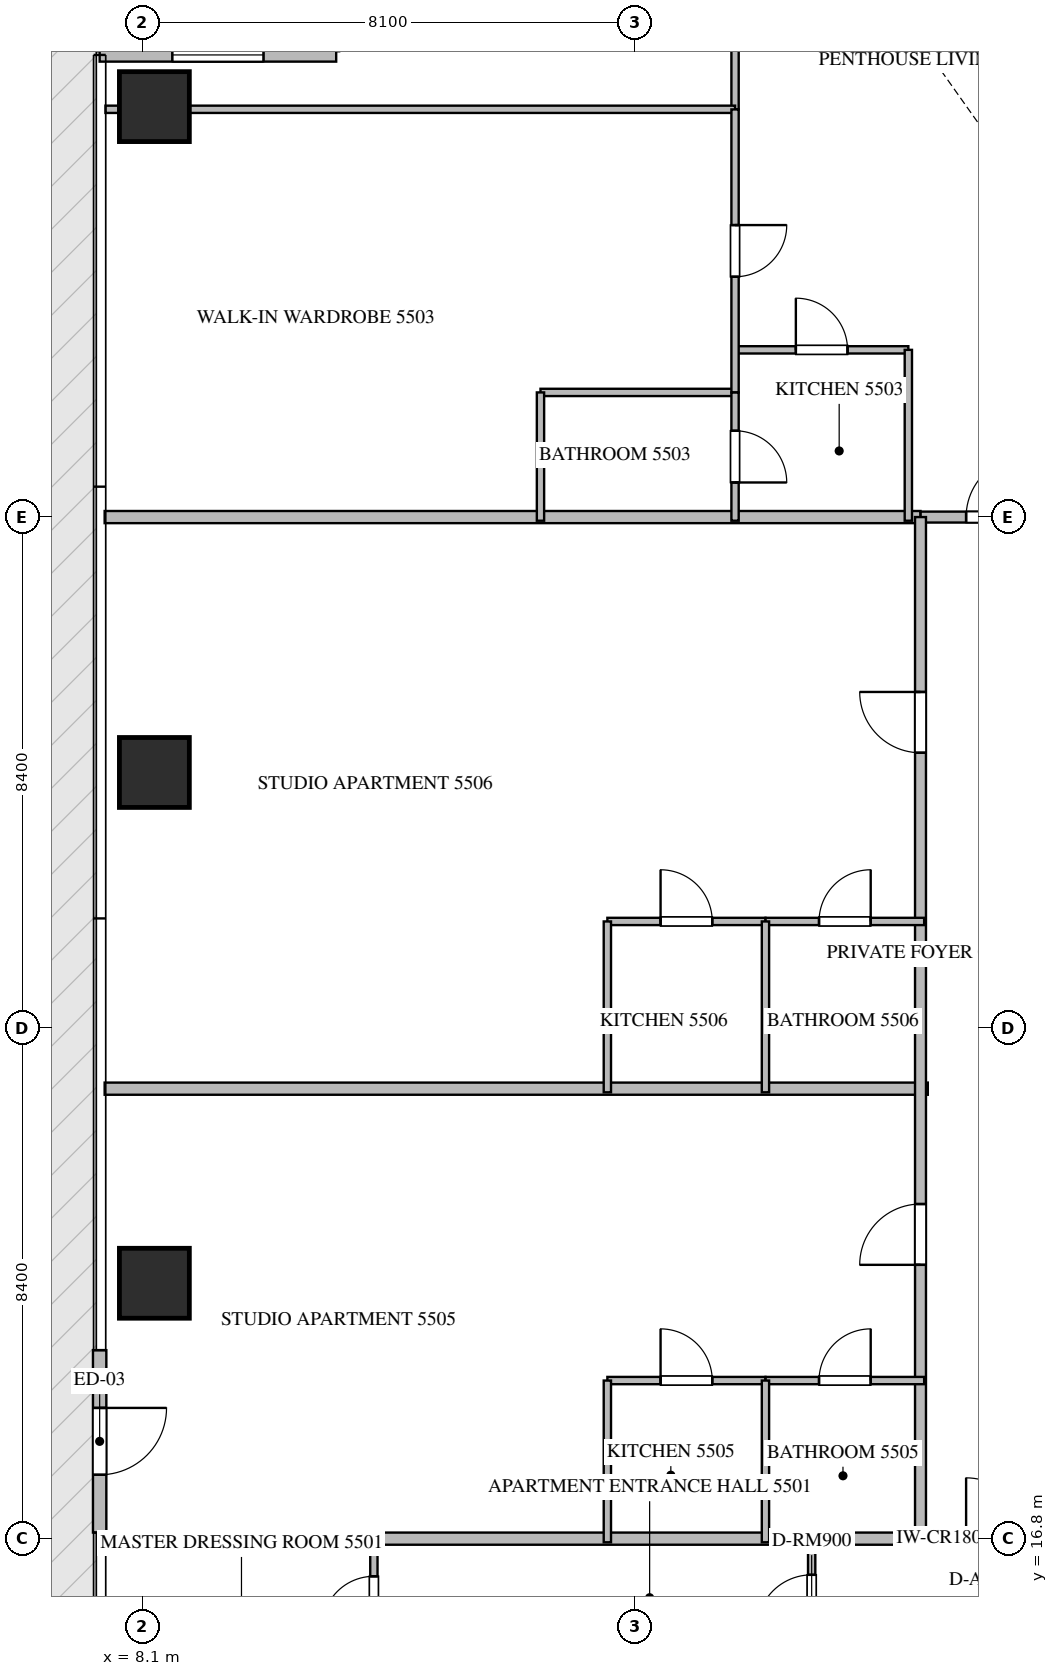
"""IFC4 building model, lengths in metres.
Left out: names, types, materials, properties, quantities, classifications, styles, units other than length and angle.
Written with IfcOpenShell. Run it as: python <this file> out.ifc"""

import sys

from ifc_helpers import new_model, si_unit, direction, frame, frame_2d, origin, origin_2d, place, context, subcontext, project, spatial, rectangle, extrude, source, transform, mapped, element, fill, save


model = new_model("IFC4")
c1 = context("Model", 3, precision=1e-05, world=origin(), true_north=direction((0.0, 1.0)))
c2 = subcontext(c1, "Body", "Model", "MODEL_VIEW")
j1 = project(units=[si_unit("LENGTHUNIT", "METRE"), si_unit("PLANEANGLEUNIT", "RADIAN")], contexts=[c1])
p1 = place(None, origin())
s1 = spatial("IfcSite", under=j1, at=p1, CompositionType="ELEMENT")
p2 = place(p1, origin())
s2 = spatial("IfcBuilding", under=s1, at=p2, CompositionType="ELEMENT")
p3 = place(p2, frame((0.0, 0.0, 222.0)))
s3 = spatial("IfcBuildingStorey", under=s2, at=p3, CompositionType="ELEMENT", Elevation=222.0)
m1 = source(origin(), c2, "Body", "SweptSolid", [
    extrude(rectangle(XDim=1.15, YDim=1.15, at=origin_2d()), origin(), (0.0, 0.0, 1.0), 3.85),
])
for number, where, z_axis, x_axis in (
    (1, (8.3, 21.0, -0.26), (0.0, 0.0, 1.0), (1.0, 0.0, 0.0)),
    (2, (8.3, 29.4, -0.26), (0.0, 0.0, 1.0), (1.0, 0.0, 0.0)),
    (3, (8.3, 40.35, -0.26), (0.0, 0.0, 1.0), (1.0, 0.0, 0.0)),
):
    element("IfcColumn", number, at=place(p3, frame(where, z_axis=z_axis, x_axis=x_axis)), inside=s3, PredefinedType="COLUMN", context=c2, shape_type="MappedRepresentation", body=[
        mapped(m1, transform((0.0, 0.0, 0.0), scale=1.0)),
    ])
p4 = place(p3, frame((11.29, 41.2, 0.0), z_axis=(0.0, 0.0, 1.0), x_axis=(-1.0, 0.0, 0.0)))
e4 = element("IfcWall", 4, at=p4, inside=s3, PredefinedType="ELEMENTEDWALL", context=c2, shape_type="SweptSolid", body=[
    extrude(rectangle(XDim=3.89, YDim=0.22, at=frame_2d((1.945, 0.0))), origin(), (0.0, 0.0, 1.0), 3.575),
])
p5 = place(p4, frame((1.195, 0.0, 0.65)))
e5 = element("IfcOpeningElement", 5, at=p5, cuts=e4, PredefinedType="OPENING", context=c2, shape_type="SweptSolid", body=[
    extrude(rectangle(XDim=1.5, YDim=2.25, at=frame_2d((0.75, 1.125))), frame((0.0, 0.12, 0.0), z_axis=(0.0, -1.0, 0.0), x_axis=(1.0, 0.0, 0.0)), (0.0, 0.0, 1.0), 0.24),
])
p6 = place(p3, frame((7.4, 19.9, 0.0), z_axis=(0.0, 0.0, 1.0), x_axis=(0.0, -1.0, 0.0)))
e6 = element("IfcWall", 6, at=p6, inside=s3, PredefinedType="ELEMENTEDWALL", context=c2, shape_type="SweptSolid", body=[
    extrude(rectangle(XDim=3.0, YDim=0.22, at=frame_2d((1.5, 0.0))), origin(), (0.0, 0.0, 1.0), 3.575),
])
p7 = place(p6, frame((0.95, 0.0, 0.0)))
e7 = element("IfcOpeningElement", 7, at=p7, cuts=e6, PredefinedType="OPENING", context=c2, shape_type="SweptSolid", body=[
    extrude(rectangle(XDim=1.1, YDim=2.2, at=frame_2d((0.55, 1.1))), frame((0.0, 0.12, 0.0), z_axis=(0.0, -1.0, 0.0), x_axis=(1.0, 0.0, 0.0)), (0.0, 0.0, 1.0), 0.24),
])
p8 = place(p3, frame((7.482, 24.2, 0.0), z_axis=(0.0, 0.0, 1.0), x_axis=(1.0, 0.0, 0.0)))
e8 = element("IfcWall", 8, at=p8, inside=s3, PredefinedType="PARTITIONING", context=c2, shape_type="SweptSolid", body=[
    extrude(rectangle(XDim=13.538, YDim=0.2, at=frame_2d((6.769, 0.0))), origin(), (0.0, 0.0, 1.0), 3.59),
])
for number, where, z_axis, x_axis in (
    (9, (7.482, 16.8, 0.0), (0.0, 0.0, 1.0), (1.0, 0.0, 0.0)),
    (10, (7.482, 33.6, 0.0), (0.0, 0.0, 1.0), (1.0, 0.0, 0.0)),
):
    element("IfcWall", number, at=place(p3, frame(where, z_axis=z_axis, x_axis=x_axis)), inside=s3, PredefinedType="PARTITIONING", context=c2, shape_type="SweptSolid", body=[
        extrude(rectangle(XDim=13.418, YDim=0.2, at=frame_2d((6.709, 0.0))), origin(), (0.0, 0.0, 1.0), 3.59),
    ])
p9 = place(p3, frame((20.902, 16.8, 0.0), z_axis=(0.0, 0.0, 1.0), x_axis=(1.0, 0.0, 0.0)))
e11 = element("IfcWall", 11, at=p9, inside=s3, PredefinedType="PARTITIONING", context=c2, shape_type="SweptSolid", body=[
    extrude(rectangle(XDim=2.496, YDim=0.18, at=frame_2d((1.248, 0.0))), origin(), (0.0, 0.0, 1.0), 3.59),
])
p10 = place(p9, frame((0.748, 0.0, 0.0)))
e12 = element("IfcOpeningElement", 12, at=p10, cuts=e11, PredefinedType="OPENING", context=c2, shape_type="SweptSolid", body=[
    extrude(rectangle(XDim=1.0, YDim=2.15, at=frame_2d((0.5, 1.075))), frame((0.0, 0.1, 0.0), z_axis=(0.0, -1.0, 0.0), x_axis=(1.0, 0.0, 0.0)), (0.0, 0.0, 1.0), 0.2),
])
p11 = place(p3, frame((20.902, 33.6, 0.0), z_axis=(0.0, 0.0, 1.0), x_axis=(1.0, 0.0, 0.0)))
e13 = element("IfcWall", 13, at=p11, inside=s3, PredefinedType="PARTITIONING", context=c2, shape_type="SweptSolid", body=[
    extrude(rectangle(XDim=2.496, YDim=0.18, at=frame_2d((1.248, 0.0))), origin(), (0.0, 0.0, 1.0), 3.59),
])
p12 = place(p11, frame((0.748, 0.0, 0.0)))
e14 = element("IfcOpeningElement", 14, at=p12, cuts=e13, PredefinedType="OPENING", context=c2, shape_type="SweptSolid", body=[
    extrude(rectangle(XDim=1.0, YDim=2.15, at=frame_2d((0.5, 1.075))), frame((0.0, 0.1, 0.0), z_axis=(0.0, -1.0, 0.0), x_axis=(1.0, 0.0, 0.0)), (0.0, 0.0, 1.0), 0.2),
])
p13 = place(p3, frame((20.9, 16.8, 0.0), z_axis=(0.0, 0.0, 1.0), x_axis=(0.0, 1.0, 0.0)))
e15 = element("IfcWall", 15, at=p13, inside=s3, PredefinedType="PARTITIONING", context=c2, shape_type="SweptSolid", body=[
    extrude(rectangle(XDim=16.8, YDim=0.18, at=frame_2d((8.4, 0.0))), origin(), (0.0, 0.0, 1.0), 3.59),
])
p14 = place(p13, frame((4.503, 0.0, 0.0)))
e16 = element("IfcOpeningElement", 16, at=p14, cuts=e15, PredefinedType="OPENING", context=c2, shape_type="SweptSolid", body=[
    extrude(rectangle(XDim=1.0, YDim=2.15, at=frame_2d((0.5, 1.075))), frame((0.0, 0.1, 0.0), z_axis=(0.0, -1.0, 0.0), x_axis=(1.0, 0.0, 0.0)), (0.0, 0.0, 1.0), 0.2),
])
p15 = place(p13, frame((12.924, 0.0, 0.0)))
e17 = element("IfcOpeningElement", 17, at=p15, cuts=e15, PredefinedType="OPENING", context=c2, shape_type="SweptSolid", body=[
    extrude(rectangle(XDim=1.0, YDim=2.15, at=frame_2d((0.5, 1.075))), frame((0.0, 0.1, 0.0), z_axis=(0.0, -1.0, 0.0), x_axis=(1.0, 0.0, 0.0)), (0.0, 0.0, 1.0), 0.2),
])
p16 = place(p3, frame((19.11, 14.65, 0.0), z_axis=(0.0, 0.0, 1.0), x_axis=(0.0, 1.0, 0.0)))
e18 = element("IfcWall", 18, at=p16, inside=s3, PredefinedType="PARTITIONING", context=c2, shape_type="SweptSolid", body=[
    extrude(rectangle(XDim=2.21, YDim=0.12, at=frame_2d((1.105, 0.0))), origin(), (0.0, 0.0, 1.0), 3.59),
])
p17 = place(p16, frame((0.655, 0.0, 0.0)))
e19 = element("IfcOpeningElement", 19, at=p17, cuts=e18, PredefinedType="OPENING", context=c2, shape_type="SweptSolid", body=[
    extrude(rectangle(XDim=0.9, YDim=2.1, at=frame_2d((0.45, 1.05))), frame((0.0, 0.07, 0.0), z_axis=(0.0, -1.0, 0.0), x_axis=(1.0, 0.0, 0.0)), (0.0, 0.0, 1.0), 0.14),
])
p18 = place(p3, frame((11.91, 14.652, 0.0), z_axis=(0.0, 0.0, 1.0), x_axis=(0.0, 1.0, 0.0)))
e20 = element("IfcWall", 20, at=p18, inside=s3, PredefinedType="PARTITIONING", context=c2, shape_type="SweptSolid", body=[
    extrude(rectangle(XDim=2.208, YDim=0.12, at=frame_2d((1.104, 0.0))), origin(), (0.0, 0.0, 1.0), 3.59),
])
p19 = place(p18, frame((0.679, 0.0, 0.0)))
e21 = element("IfcOpeningElement", 21, at=p19, cuts=e20, PredefinedType="OPENING", context=c2, shape_type="SweptSolid", body=[
    extrude(rectangle(XDim=0.85, YDim=2.1, at=frame_2d((0.425, 1.05))), frame((0.0, 0.07, 0.0), z_axis=(0.0, -1.0, 0.0), x_axis=(1.0, 0.0, 0.0)), (0.0, 0.0, 1.0), 0.14),
])
p20 = place(p3, frame((17.85, 36.35, 0.0), z_axis=(0.0, 0.0, 1.0), x_axis=(1.0, 0.0, 0.0)))
e22 = element("IfcWall", 22, at=p20, inside=s3, PredefinedType="PARTITIONING", context=c2, shape_type="SweptSolid", body=[
    extrude(rectangle(XDim=2.85, YDim=0.12, at=frame_2d((1.425, 0.0))), origin(), (0.0, 0.0, 1.0), 3.59),
])
p21 = place(p20, frame((1.0, 0.0, 0.0)))
e23 = element("IfcOpeningElement", 23, at=p21, cuts=e22, PredefinedType="OPENING", context=c2, shape_type="SweptSolid", body=[
    extrude(rectangle(XDim=0.85, YDim=2.1, at=frame_2d((0.425, 1.05))), frame((0.0, 0.07, 0.0), z_axis=(0.0, -1.0, 0.0), x_axis=(1.0, 0.0, 0.0)), (0.0, 0.0, 1.0), 0.14),
])
p22 = place(p3, frame((20.7, 36.35, 0.0), z_axis=(0.0, 0.0, 1.0), x_axis=(0.0, -1.0, 0.0)))
e24 = element("IfcWall", 24, at=p22, inside=s3, PredefinedType="PARTITIONING", context=c2, shape_type="SweptSolid", body=[
    extrude(rectangle(XDim=2.81, YDim=0.12, at=frame_2d((1.405, 0.0))), origin(), (0.0, 0.0, 1.0), 3.59),
])
p23 = place(p3, frame((17.85, 49.105, 0.0), z_axis=(0.0, 0.0, 1.0), x_axis=(0.0, -1.0, 0.0)))
e25 = element("IfcWall", 25, at=p23, inside=s3, PredefinedType="PARTITIONING", context=c2, shape_type="SweptSolid", body=[
    extrude(rectangle(XDim=8.799, YDim=0.12, at=frame_2d((4.399, 0.0))), origin(), (0.0, 0.0, 1.0), 3.59),
])
p24 = place(p23, frame((4.344, 0.0, 0.0)))
e26 = element("IfcOpeningElement", 26, at=p24, cuts=e25, PredefinedType="OPENING", context=c2, shape_type="SweptSolid", body=[
    extrude(rectangle(XDim=0.9, YDim=2.1, at=frame_2d((0.45, 1.05))), frame((0.0, 0.07, 0.0), z_axis=(0.0, -1.0, 0.0), x_axis=(1.0, 0.0, 0.0)), (0.0, 0.0, 1.0), 0.14),
])
p25 = place(p3, frame((7.495, 40.306, 0.0), z_axis=(0.0, 0.0, 1.0), x_axis=(1.0, 0.0, 0.0)))
e27 = element("IfcWall", 27, at=p25, inside=s3, PredefinedType="PARTITIONING", context=c2, shape_type="SweptSolid", body=[
    extrude(rectangle(XDim=10.355, YDim=0.12, at=frame_2d((5.177, 0.0))), origin(), (0.0, 0.0, 1.0), 3.122),
])
p26 = place(p3, frame((14.65, 35.65, 0.0), z_axis=(0.0, 0.0, 1.0), x_axis=(1.0, 0.0, 0.0)))
e28 = element("IfcWall", 28, at=p26, inside=s3, PredefinedType="PARTITIONING", context=c2, shape_type="SweptSolid", body=[
    extrude(rectangle(XDim=3.2, YDim=0.12, at=frame_2d((1.6, 0.0))), origin(), (0.0, 0.0, 1.0), 3.59),
])
p27 = place(p3, frame((14.65, 35.65, 0.0), z_axis=(0.0, 0.0, 1.0), x_axis=(0.0, -1.0, 0.0)))
e29 = element("IfcWall", 29, at=p27, inside=s3, PredefinedType="PARTITIONING", context=c2, shape_type="SweptSolid", body=[
    extrude(rectangle(XDim=2.11, YDim=0.12, at=frame_2d((1.055, 0.0))), origin(), (0.0, 0.0, 1.0), 3.59),
])
p28 = place(p3, frame((17.85, 40.304, 0.0), z_axis=(0.0, 0.0, 1.0), x_axis=(0.0, -1.0, 0.0)))
e30 = element("IfcWall", 30, at=p28, inside=s3, PredefinedType="PARTITIONING", context=c2, shape_type="SweptSolid", body=[
    extrude(rectangle(XDim=4.654, YDim=0.12, at=frame_2d((2.327, 0.0))), origin(), (0.0, 0.0, 1.0), 3.59),
])
p29 = place(p28, frame((1.902, 0.0, 0.0)))
e31 = element("IfcOpeningElement", 31, at=p29, cuts=e30, PredefinedType="OPENING", context=c2, shape_type="SweptSolid", body=[
    extrude(rectangle(XDim=0.85, YDim=2.1, at=frame_2d((0.425, 1.05))), frame((0.0, 0.07, 0.0), z_axis=(0.0, -1.0, 0.0), x_axis=(1.0, 0.0, 0.0)), (0.0, 0.0, 1.0), 0.14),
])
p30 = place(p3, frame((17.85, 35.648, 0.0), z_axis=(0.0, 0.0, 1.0), x_axis=(0.0, -1.0, 0.0)))
e32 = element("IfcWall", 32, at=p30, inside=s3, PredefinedType="PARTITIONING", context=c2, shape_type="SweptSolid", body=[
    extrude(rectangle(XDim=2.108, YDim=0.12, at=frame_2d((1.054, 0.0))), origin(), (0.0, 0.0, 1.0), 3.59),
])
p31 = place(p30, frame((0.629, 0.0, 0.0)))
e33 = element("IfcOpeningElement", 33, at=p31, cuts=e32, PredefinedType="OPENING", context=c2, shape_type="SweptSolid", body=[
    extrude(rectangle(XDim=0.85, YDim=2.1, at=frame_2d((0.425, 1.05))), frame((0.0, 0.07, 0.0), z_axis=(0.0, -1.0, 0.0), x_axis=(1.0, 0.0, 0.0)), (0.0, 0.0, 1.0), 0.14),
])
p32 = place(p3, frame((15.75, 19.4, 0.0), z_axis=(0.0, 0.0, 1.0), x_axis=(1.0, 0.0, 0.0)))
e34 = element("IfcWall", 34, at=p32, inside=s3, PredefinedType="PARTITIONING", context=c2, shape_type="SweptSolid", body=[
    extrude(rectangle(XDim=2.6, YDim=0.12, at=frame_2d((1.3, 0.0))), origin(), (0.0, 0.0, 1.0), 3.59),
])
p33 = place(p32, frame((0.875, 0.0, 0.0)))
e35 = element("IfcOpeningElement", 35, at=p33, cuts=e34, PredefinedType="OPENING", context=c2, shape_type="SweptSolid", body=[
    extrude(rectangle(XDim=0.85, YDim=2.1, at=frame_2d((0.425, 1.05))), frame((0.0, 0.07, 0.0), z_axis=(0.0, -1.0, 0.0), x_axis=(1.0, 0.0, 0.0)), (0.0, 0.0, 1.0), 0.14),
])
p34 = place(p3, frame((18.352, 19.4, 0.0), z_axis=(0.0, 0.0, 1.0), x_axis=(1.0, 0.0, 0.0)))
e36 = element("IfcWall", 36, at=p34, inside=s3, PredefinedType="PARTITIONING", context=c2, shape_type="SweptSolid", body=[
    extrude(rectangle(XDim=2.608, YDim=0.12, at=frame_2d((1.304, 0.0))), origin(), (0.0, 0.0, 1.0), 3.59),
])
p35 = place(p34, frame((0.879, 0.0, 0.0)))
e37 = element("IfcOpeningElement", 37, at=p35, cuts=e36, PredefinedType="OPENING", context=c2, shape_type="SweptSolid", body=[
    extrude(rectangle(XDim=0.85, YDim=2.1, at=frame_2d((0.425, 1.05))), frame((0.0, 0.07, 0.0), z_axis=(0.0, -1.0, 0.0), x_axis=(1.0, 0.0, 0.0)), (0.0, 0.0, 1.0), 0.14),
])
for number, where, z_axis, x_axis in (
    (38, (18.35, 16.74, 0.0), (0.0, 0.0, 1.0), (0.0, 1.0, 0.0)),
    (39, (15.75, 16.74, 0.0), (0.0, 0.0, 1.0), (0.0, 1.0, 0.0)),
):
    element("IfcWall", number, at=place(p3, frame(where, z_axis=z_axis, x_axis=x_axis)), inside=s3, PredefinedType="PARTITIONING", context=c2, shape_type="SweptSolid", body=[
        extrude(rectangle(XDim=2.66, YDim=0.12, at=frame_2d((1.33, 0.0))), origin(), (0.0, 0.0, 1.0), 3.59),
    ])
p36 = place(p3, frame((15.75, 26.95, 0.0), z_axis=(0.0, 0.0, 1.0), x_axis=(1.0, 0.0, 0.0)))
e40 = element("IfcWall", 40, at=p36, inside=s3, PredefinedType="PARTITIONING", context=c2, shape_type="SweptSolid", body=[
    extrude(rectangle(XDim=2.6, YDim=0.12, at=frame_2d((1.3, 0.0))), origin(), (0.0, 0.0, 1.0), 3.59),
])
p37 = place(p36, frame((0.875, 0.0, 0.0)))
e41 = element("IfcOpeningElement", 41, at=p37, cuts=e40, PredefinedType="OPENING", context=c2, shape_type="SweptSolid", body=[
    extrude(rectangle(XDim=0.85, YDim=2.1, at=frame_2d((0.425, 1.05))), frame((0.0, 0.07, 0.0), z_axis=(0.0, -1.0, 0.0), x_axis=(1.0, 0.0, 0.0)), (0.0, 0.0, 1.0), 0.14),
])
p38 = place(p3, frame((18.352, 26.95, 0.0), z_axis=(0.0, 0.0, 1.0), x_axis=(1.0, 0.0, 0.0)))
e42 = element("IfcWall", 42, at=p38, inside=s3, PredefinedType="PARTITIONING", context=c2, shape_type="SweptSolid", body=[
    extrude(rectangle(XDim=2.608, YDim=0.12, at=frame_2d((1.304, 0.0))), origin(), (0.0, 0.0, 1.0), 3.59),
])
p39 = place(p38, frame((0.879, 0.0, 0.0)))
e43 = element("IfcOpeningElement", 43, at=p39, cuts=e42, PredefinedType="OPENING", context=c2, shape_type="SweptSolid", body=[
    extrude(rectangle(XDim=0.85, YDim=2.1, at=frame_2d((0.425, 1.05))), frame((0.0, 0.07, 0.0), z_axis=(0.0, -1.0, 0.0), x_axis=(1.0, 0.0, 0.0)), (0.0, 0.0, 1.0), 0.14),
])
for number, where, z_axis, x_axis in (
    (44, (18.35, 24.14, 0.0), (0.0, 0.0, 1.0), (0.0, 1.0, 0.0)),
    (45, (15.75, 24.14, 0.0), (0.0, 0.0, 1.0), (0.0, 1.0, 0.0)),
):
    element("IfcWall", number, at=place(p3, frame(where, z_axis=z_axis, x_axis=x_axis)), inside=s3, PredefinedType="PARTITIONING", context=c2, shape_type="SweptSolid", body=[
        extrude(rectangle(XDim=2.81, YDim=0.12, at=frame_2d((1.405, 0.0))), origin(), (0.0, 0.0, 1.0), 3.59),
    ])
m2 = source(origin(), c2, "Body", "SweptSolid", [
    extrude(rectangle(XDim=1.5, YDim=2.25, at=frame_2d((0.75, 1.125))), frame((0.0, 0.03, 0.0), z_axis=(0.0, -1.0, 0.0), x_axis=(1.0, 0.0, 0.0)), (0.0, 0.0, 1.0), 0.06),
])
p40 = place(p5, origin())
e46 = element("IfcWindow", 46, at=p40, inside=s3, PartitioningType="SINGLE_PANEL", PredefinedType="WINDOW", context=c2, shape_type="MappedRepresentation", body=[
    mapped(m2, transform((0.0, 0.0, 0.0), scale=1.0)),
])
fill(e5, e46)
m3 = source(origin(), c2, "Body", "SweptSolid", [
    extrude(rectangle(XDim=1.1, YDim=2.2, at=frame_2d((0.55, 1.1))), frame((0.0, 0.025, 0.0), z_axis=(0.0, -1.0, 0.0), x_axis=(1.0, 0.0, 0.0)), (0.0, 0.0, 1.0), 0.05),
])
p41 = place(p7, origin())
e47 = element("IfcDoor", 47, at=p41, inside=s3, OperationType="SINGLE_SWING_LEFT", PredefinedType="DOOR", context=c2, shape_type="MappedRepresentation", body=[
    mapped(m3, transform((0.0, 0.0, 0.0), scale=1.0)),
])
fill(e7, e47)
m4 = source(origin(), c2, "Body", "SweptSolid", [
    extrude(rectangle(XDim=1.0, YDim=2.15, at=frame_2d((0.5, 1.075))), frame((0.0, 0.025, 0.0), z_axis=(0.0, -1.0, 0.0), x_axis=(1.0, 0.0, 0.0)), (0.0, 0.0, 1.0), 0.05),
])
p42 = place(p10, origin())
e48 = element("IfcDoor", 48, at=p42, inside=s3, OperationType="SINGLE_SWING_LEFT", PredefinedType="DOOR", context=c2, shape_type="MappedRepresentation", body=[
    mapped(m4, transform((0.0, 0.0, 0.0), scale=1.0)),
])
fill(e12, e48)
p43 = place(p12, origin())
e49 = element("IfcDoor", 49, at=p43, inside=s3, OperationType="SINGLE_SWING_RIGHT", PredefinedType="DOOR", context=c2, shape_type="MappedRepresentation", body=[
    mapped(m4, transform((0.0, 0.0, 0.0), scale=1.0)),
])
fill(e14, e49)
p44 = place(p14, origin())
e50 = element("IfcDoor", 50, at=p44, inside=s3, OperationType="SINGLE_SWING_LEFT", PredefinedType="DOOR", context=c2, shape_type="MappedRepresentation", body=[
    mapped(m4, transform((0.0, 0.0, 0.0), scale=1.0)),
])
fill(e16, e50)
p45 = place(p15, origin())
e51 = element("IfcDoor", 51, at=p45, inside=s3, OperationType="SINGLE_SWING_RIGHT", PredefinedType="DOOR", context=c2, shape_type="MappedRepresentation", body=[
    mapped(m4, transform((0.0, 0.0, 0.0), scale=1.0)),
])
fill(e17, e51)
m5 = source(origin(), c2, "Body", "SweptSolid", [
    extrude(rectangle(XDim=0.9, YDim=2.1, at=frame_2d((0.45, 1.05))), frame((0.0, 0.025, 0.0), z_axis=(0.0, -1.0, 0.0), x_axis=(1.0, 0.0, 0.0)), (0.0, 0.0, 1.0), 0.05),
])
p46 = place(p17, origin())
e52 = element("IfcDoor", 52, at=p46, inside=s3, OperationType="SINGLE_SWING_LEFT", PredefinedType="DOOR", context=c2, shape_type="MappedRepresentation", body=[
    mapped(m5, transform((0.0, 0.0, 0.0), scale=1.0)),
])
fill(e19, e52)
m6 = source(origin(), c2, "Body", "SweptSolid", [
    extrude(rectangle(XDim=0.85, YDim=2.1, at=frame_2d((0.425, 1.05))), frame((0.0, 0.025, 0.0), z_axis=(0.0, -1.0, 0.0), x_axis=(1.0, 0.0, 0.0)), (0.0, 0.0, 1.0), 0.05),
])
p47 = place(p19, origin())
e53 = element("IfcDoor", 53, at=p47, inside=s3, OperationType="SINGLE_SWING_LEFT", PredefinedType="DOOR", context=c2, shape_type="MappedRepresentation", body=[
    mapped(m6, transform((0.0, 0.0, 0.0), scale=1.0)),
])
fill(e21, e53)
p48 = place(p21, origin())
e54 = element("IfcDoor", 54, at=p48, inside=s3, OperationType="SINGLE_SWING_LEFT", PredefinedType="DOOR", context=c2, shape_type="MappedRepresentation", body=[
    mapped(m6, transform((0.0, 0.0, 0.0), scale=1.0)),
])
fill(e23, e54)
p49 = place(p29, origin())
e55 = element("IfcDoor", 55, at=p49, inside=s3, OperationType="SINGLE_SWING_LEFT", PredefinedType="DOOR", context=c2, shape_type="MappedRepresentation", body=[
    mapped(m6, transform((0.0, 0.0, 0.0), scale=1.0)),
])
fill(e31, e55)
p50 = place(p31, origin())
e56 = element("IfcDoor", 56, at=p50, inside=s3, OperationType="SINGLE_SWING_RIGHT", PredefinedType="DOOR", context=c2, shape_type="MappedRepresentation", body=[
    mapped(m6, transform((0.0, 0.0, 0.0), scale=1.0)),
])
fill(e33, e56)
p51 = place(p33, origin())
e57 = element("IfcDoor", 57, at=p51, inside=s3, OperationType="SINGLE_SWING_LEFT", PredefinedType="DOOR", context=c2, shape_type="MappedRepresentation", body=[
    mapped(m6, transform((0.0, 0.0, 0.0), scale=1.0)),
])
fill(e35, e57)
p52 = place(p35, origin())
e58 = element("IfcDoor", 58, at=p52, inside=s3, OperationType="SINGLE_SWING_RIGHT", PredefinedType="DOOR", context=c2, shape_type="MappedRepresentation", body=[
    mapped(m6, transform((0.0, 0.0, 0.0), scale=1.0)),
])
fill(e37, e58)
p53 = place(p37, origin())
e59 = element("IfcDoor", 59, at=p53, inside=s3, OperationType="SINGLE_SWING_LEFT", PredefinedType="DOOR", context=c2, shape_type="MappedRepresentation", body=[
    mapped(m6, transform((0.0, 0.0, 0.0), scale=1.0)),
])
fill(e41, e59)
p54 = place(p39, origin())
e60 = element("IfcDoor", 60, at=p54, inside=s3, OperationType="SINGLE_SWING_RIGHT", PredefinedType="DOOR", context=c2, shape_type="MappedRepresentation", body=[
    mapped(m6, transform((0.0, 0.0, 0.0), scale=1.0)),
])
fill(e43, e60)
save(model, sys.argv[1])
